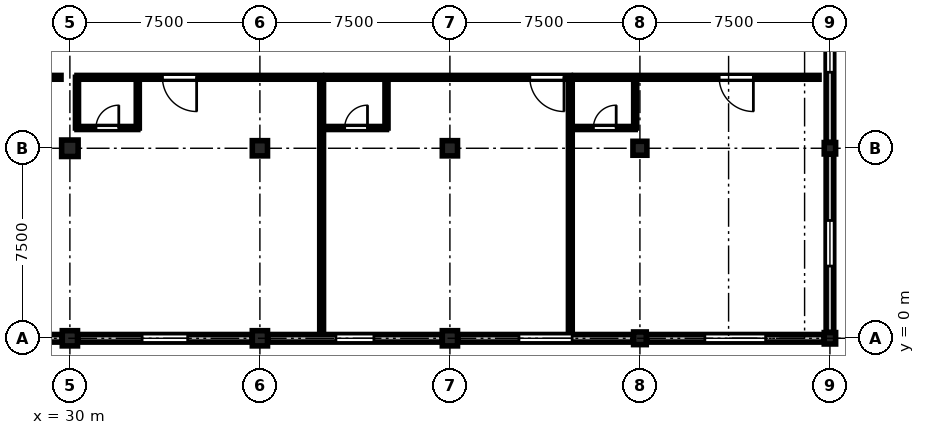
"""IFC4 building model, lengths in metres.
Left out: names, types, materials, properties, quantities, classifications, styles, units other than length and angle.
Written with IfcOpenShell. Run it as: python <this file> out.ifc"""

import sys

from ifc_helpers import new_model, si_unit, direction, frame, frame_2d, origin, origin_2d, place, context, subcontext, project, spatial, rectangle, circle, extrude, element, fill, save


model = new_model("IFC4")
c1 = context("Model", 3, precision=1e-05, world=origin(), true_north=direction((0.0, 1.0)))
c2 = subcontext(c1, "Body", "Model", "MODEL_VIEW")
j1 = project(units=[si_unit("LENGTHUNIT", "METRE"), si_unit("PLANEANGLEUNIT", "RADIAN")], contexts=[c1])
p1 = place(None, origin())
s1 = spatial("IfcSite", under=j1, at=p1, CompositionType="ELEMENT")
p2 = place(p1, origin())
s2 = spatial("IfcBuilding", under=s1, at=p2, CompositionType="ELEMENT")
p3 = place(p2, frame((0.0, 0.0, 17.85)))
s3 = spatial("IfcBuildingStorey", under=s2, at=p3, CompositionType="ELEMENT", Elevation=17.85)
p4 = place(p3, frame((30.0, 0.0, 0.0), z_axis=(0.0, 0.0, 1.0), x_axis=(1.0, 0.0, 0.0)))
e1 = element("IfcColumn", 1, at=p4, inside=s3, PredefinedType="COLUMN", context=c2, shape_type="SweptSolid", body=[
    extrude(rectangle(XDim=0.6, YDim=0.6, at=origin_2d()), origin(), (0.0, 0.0, 1.0), 4.05),
])
p5 = place(p3, frame((30.0, 7.5, 0.0), z_axis=(0.0, 0.0, 1.0), x_axis=(1.0, 0.0, 0.0)))
e2 = element("IfcColumn", 2, at=p5, inside=s3, PredefinedType="COLUMN", context=c2, shape_type="SweptSolid", body=[
    extrude(rectangle(XDim=0.65, YDim=0.65, at=origin_2d()), origin(), (0.0, 0.0, 1.0), 4.05),
])
p6 = place(p3, frame((37.5, 0.0, 0.0), z_axis=(0.0, 0.0, 1.0), x_axis=(1.0, 0.0, 0.0)))
e3 = element("IfcColumn", 3, at=p6, inside=s3, PredefinedType="COLUMN", context=c2, shape_type="SweptSolid", body=[
    extrude(rectangle(XDim=0.6, YDim=0.6, at=origin_2d()), origin(), (0.0, 0.0, 1.0), 4.05),
])
for number, where, z_axis, x_axis in (
    (4, (37.5, 7.5, 0.0), (0.0, 0.0, 1.0), (1.0, 0.0, 0.0)),
    (5, (45.0, 0.0, 0.0), (0.0, 0.0, 1.0), (1.0, 0.0, 0.0)),
):
    element("IfcColumn", number, at=place(p3, frame(where, z_axis=z_axis, x_axis=x_axis)), inside=s3, PredefinedType="COLUMN", context=c2, shape_type="SweptSolid", body=[
        extrude(circle(Radius=0.3, at=origin_2d()), origin(), (0.0, 0.0, 1.0), 4.05),
    ])
p7 = place(p3, frame((45.0, 7.5, 0.0), z_axis=(0.0, 0.0, 1.0), x_axis=(1.0, 0.0, 0.0)))
e6 = element("IfcColumn", 6, at=p7, inside=s3, PredefinedType="COLUMN", context=c2, shape_type="SweptSolid", body=[
    extrude(rectangle(XDim=0.6, YDim=0.6, at=origin_2d()), origin(), (0.0, 0.0, 1.0), 4.05),
])
p8 = place(p3, frame((52.5, 0.0, 0.0), z_axis=(0.0, 0.0, 1.0), x_axis=(1.0, 0.0, 0.0)))
e7 = element("IfcColumn", 7, at=p8, inside=s3, PredefinedType="COLUMN", context=c2, shape_type="SweptSolid", body=[
    extrude(rectangle(XDim=0.5, YDim=0.5, at=origin_2d()), origin(), (0.0, 0.0, 1.0), 4.05),
])
p9 = place(p3, frame((52.5, 7.5, 0.0), z_axis=(0.0, 0.0, 1.0), x_axis=(1.0, 0.0, 0.0)))
e8 = element("IfcColumn", 8, at=p9, inside=s3, PredefinedType="COLUMN", context=c2, shape_type="SweptSolid", body=[
    extrude(rectangle(XDim=0.55, YDim=0.55, at=origin_2d()), origin(), (0.0, 0.0, 1.0), 4.05),
])
for number, where, z_axis, x_axis in (
    (9, (60.0, 0.0, 0.0), (0.0, 0.0, 1.0), (1.0, 0.0, 0.0)),
    (10, (60.0, 7.5, 0.0), (0.0, 0.0, 1.0), (1.0, 0.0, 0.0)),
):
    element("IfcColumn", number, at=place(p3, frame(where, z_axis=z_axis, x_axis=x_axis)), inside=s3, PredefinedType="COLUMN", context=c2, shape_type="SweptSolid", body=[
        extrude(rectangle(XDim=0.45, YDim=0.45, at=origin_2d()), origin(), (0.0, 0.0, 1.0), 4.05),
    ])
p10 = place(p3, frame((29.69, 0.0, 0.0), z_axis=(0.0, 0.0, 1.0), x_axis=(-1.0, 0.0, 0.0)))
e11 = element("IfcWall", 11, at=p10, inside=s3, PredefinedType="STANDARD", context=c2, shape_type="SweptSolid", body=[
    extrude(rectangle(XDim=6.88, YDim=0.3, at=frame_2d((3.44, 0.0))), origin(), (0.0, 0.0, 1.0), 3.17),
])
p11 = place(p10, frame((2.54, 0.0, 0.9)))
e12 = element("IfcOpeningElement", 12, at=p11, cuts=e11, PredefinedType="OPENING", context=c2, shape_type="SweptSolid", body=[
    extrude(rectangle(XDim=1.8, YDim=1.8, at=frame_2d((0.9, 0.9))), frame((0.0, 0.16, 0.0), z_axis=(0.0, -1.0, 0.0), x_axis=(1.0, 0.0, 0.0)), (0.0, 0.0, 1.0), 0.32),
])
p12 = place(p3, frame((37.19, 0.0, 0.0), z_axis=(0.0, 0.0, 1.0), x_axis=(-1.0, 0.0, 0.0)))
e13 = element("IfcWall", 13, at=p12, inside=s3, PredefinedType="STANDARD", context=c2, shape_type="SweptSolid", body=[
    extrude(rectangle(XDim=6.88, YDim=0.3, at=frame_2d((3.44, 0.0))), origin(), (0.0, 0.0, 1.0), 3.17),
])
p13 = place(p12, frame((2.54, 0.0, 0.9)))
e14 = element("IfcOpeningElement", 14, at=p13, cuts=e13, PredefinedType="OPENING", context=c2, shape_type="SweptSolid", body=[
    extrude(rectangle(XDim=1.8, YDim=1.99, at=frame_2d((0.9, 0.995))), frame((0.0, 0.16, 0.0), z_axis=(0.0, -1.0, 0.0), x_axis=(1.0, 0.0, 0.0)), (0.0, 0.0, 1.0), 0.32),
])
p14 = place(p3, frame((44.69, 0.0, 0.0), z_axis=(0.0, 0.0, 1.0), x_axis=(-1.0, 0.0, 0.0)))
e15 = element("IfcWall", 15, at=p14, inside=s3, PredefinedType="STANDARD", context=c2, shape_type="SweptSolid", body=[
    extrude(rectangle(XDim=6.88, YDim=0.3, at=frame_2d((3.44, 0.0))), origin(), (0.0, 0.0, 1.0), 3.17),
])
p15 = place(p14, frame((2.69, 0.0, 0.9)))
e16 = element("IfcOpeningElement", 16, at=p15, cuts=e15, PredefinedType="OPENING", context=c2, shape_type="SweptSolid", body=[
    extrude(rectangle(XDim=1.5, YDim=1.99, at=frame_2d((0.75, 0.995))), frame((0.0, 0.16, 0.0), z_axis=(0.0, -1.0, 0.0), x_axis=(1.0, 0.0, 0.0)), (0.0, 0.0, 1.0), 0.32),
])
p16 = place(p3, frame((52.24, 0.0, 0.0), z_axis=(0.0, 0.0, 1.0), x_axis=(-1.0, 0.0, 0.0)))
e17 = element("IfcWall", 17, at=p16, inside=s3, PredefinedType="STANDARD", context=c2, shape_type="SweptSolid", body=[
    extrude(rectangle(XDim=6.93, YDim=0.3, at=frame_2d((3.465, 0.0))), origin(), (0.0, 0.0, 1.0), 3.17),
])
p17 = place(p16, frame((2.415, 0.0, 0.9)))
e18 = element("IfcOpeningElement", 18, at=p17, cuts=e17, PredefinedType="OPENING", context=c2, shape_type="SweptSolid", body=[
    extrude(rectangle(XDim=2.1, YDim=1.99, at=frame_2d((1.05, 0.995))), frame((0.0, 0.16, 0.0), z_axis=(0.0, -1.0, 0.0), x_axis=(1.0, 0.0, 0.0)), (0.0, 0.0, 1.0), 0.32),
])
p18 = place(p3, frame((59.765, 0.0, 0.0), z_axis=(0.0, 0.0, 1.0), x_axis=(-1.0, 0.0, 0.0)))
e19 = element("IfcWall", 19, at=p18, inside=s3, PredefinedType="STANDARD", context=c2, shape_type="SweptSolid", body=[
    extrude(rectangle(XDim=7.005, YDim=0.3, at=frame_2d((3.502, 0.0))), origin(), (0.0, 0.0, 1.0), 3.17),
])
p19 = place(p18, frame((2.302, 0.0, 0.9)))
e20 = element("IfcOpeningElement", 20, at=p19, cuts=e19, PredefinedType="OPENING", context=c2, shape_type="SweptSolid", body=[
    extrude(rectangle(XDim=2.4, YDim=1.99, at=frame_2d((1.2, 0.995))), frame((0.0, 0.16, 0.0), z_axis=(0.0, -1.0, 0.0), x_axis=(1.0, 0.0, 0.0)), (0.0, 0.0, 1.0), 0.32),
])
p20 = place(p3, frame((60.0, 7.265, 0.0), z_axis=(0.0, 0.0, 1.0), x_axis=(0.0, -1.0, 0.0)))
e21 = element("IfcWall", 21, at=p20, inside=s3, PredefinedType="STANDARD", context=c2, shape_type="SweptSolid", body=[
    extrude(rectangle(XDim=7.03, YDim=0.3, at=frame_2d((3.515, 0.0))), origin(), (0.0, 0.0, 1.0), 3.17),
])
p21 = place(p20, frame((2.615, 0.0, 0.9)))
e22 = element("IfcOpeningElement", 22, at=p21, cuts=e21, PredefinedType="OPENING", context=c2, shape_type="SweptSolid", body=[
    extrude(rectangle(XDim=1.8, YDim=1.99, at=frame_2d((0.9, 0.995))), frame((0.0, 0.16, 0.0), z_axis=(0.0, -1.0, 0.0), x_axis=(1.0, 0.0, 0.0)), (0.0, 0.0, 1.0), 0.32),
])
p22 = place(p3, frame((60.0, 14.765, 0.0), z_axis=(0.0, 0.0, 1.0), x_axis=(0.0, -1.0, 0.0)))
e23 = element("IfcWall", 23, at=p22, inside=s3, PredefinedType="STANDARD", context=c2, shape_type="SweptSolid", body=[
    extrude(rectangle(XDim=7.03, YDim=0.3, at=frame_2d((3.515, 0.0))), origin(), (0.0, 0.0, 1.0), 3.17),
])
p23 = place(p22, frame((2.765, 0.0, 0.9)))
e24 = element("IfcOpeningElement", 24, at=p23, cuts=e23, PredefinedType="OPENING", context=c2, shape_type="SweptSolid", body=[
    extrude(rectangle(XDim=1.5, YDim=1.99, at=frame_2d((0.75, 0.995))), frame((0.0, 0.16, 0.0), z_axis=(0.0, -1.0, 0.0), x_axis=(1.0, 0.0, 0.0)), (0.0, 0.0, 1.0), 0.32),
])
p24 = place(p3, frame((39.937, 10.3, 0.0), z_axis=(0.0, 0.0, 1.0), x_axis=(-1.0, 0.0, 0.0)))
e25 = element("IfcWall", 25, at=p24, inside=s3, PredefinedType="PARTITIONING", context=c2, shape_type="SweptSolid", body=[
    extrude(rectangle(XDim=9.657, YDim=0.15, at=frame_2d((4.828, 0.0))), origin(), (0.0, 0.0, 1.0), 3.755),
])
p25 = place(p24, frame((4.934, 0.0, 0.0)))
e26 = element("IfcOpeningElement", 26, at=p25, cuts=e25, PredefinedType="OPENING", context=c2, shape_type="SweptSolid", body=[
    extrude(rectangle(XDim=1.35, YDim=2.25, at=frame_2d((0.675, 1.125))), frame((0.0, 0.085, 0.0), z_axis=(0.0, -1.0, 0.0), x_axis=(1.0, 0.0, 0.0)), (0.0, 0.0, 1.0), 0.17),
])
p26 = place(p3, frame((30.28, 8.3, 0.0), z_axis=(0.0, 0.0, 1.0), x_axis=(1.0, 0.0, 0.0)))
e27 = element("IfcWall", 27, at=p26, inside=s3, PredefinedType="PARTITIONING", context=c2, shape_type="SweptSolid", body=[
    extrude(rectangle(XDim=2.4, YDim=0.12, at=frame_2d((1.2, 0.0))), origin(), (0.0, 0.0, 1.0), 3.755),
])
p27 = place(p26, frame((0.75, 0.0, 0.0)))
e28 = element("IfcOpeningElement", 28, at=p27, cuts=e27, PredefinedType="OPENING", context=c2, shape_type="SweptSolid", body=[
    extrude(rectangle(XDim=0.9, YDim=2.1, at=frame_2d((0.45, 1.05))), frame((0.0, 0.07, 0.0), z_axis=(0.0, -1.0, 0.0), x_axis=(1.0, 0.0, 0.0)), (0.0, 0.0, 1.0), 0.14),
])
p28 = place(p3, frame((32.68, 8.3, 0.0), z_axis=(0.0, 0.0, 1.0), x_axis=(0.0, 1.0, 0.0)))
e29 = element("IfcWall", 29, at=p28, inside=s3, PredefinedType="PARTITIONING", context=c2, shape_type="SweptSolid", body=[
    extrude(rectangle(XDim=2.0, YDim=0.12, at=frame_2d((1.0, 0.0))), origin(), (0.0, 0.0, 1.0), 3.755),
])
p29 = place(p3, frame((49.753, 10.3, 0.0), z_axis=(0.0, 0.0, 1.0), x_axis=(-1.0, 0.0, 0.0)))
e30 = element("IfcWall", 30, at=p29, inside=s3, PredefinedType="PARTITIONING", context=c2, shape_type="SweptSolid", body=[
    extrude(rectangle(XDim=9.657, YDim=0.15, at=frame_2d((4.828, 0.0))), origin(), (0.0, 0.0, 1.0), 3.755),
])
p30 = place(p29, frame((0.25, 0.0, 0.0)))
e31 = element("IfcOpeningElement", 31, at=p30, cuts=e30, PredefinedType="OPENING", context=c2, shape_type="SweptSolid", body=[
    extrude(rectangle(XDim=1.35, YDim=2.25, at=frame_2d((0.675, 1.125))), frame((0.0, 0.085, 0.0), z_axis=(0.0, -1.0, 0.0), x_axis=(1.0, 0.0, 0.0)), (0.0, 0.0, 1.0), 0.17),
])
p31 = place(p3, frame((40.097, 8.3, 0.0), z_axis=(0.0, 0.0, 1.0), x_axis=(1.0, 0.0, 0.0)))
e32 = element("IfcWall", 32, at=p31, inside=s3, PredefinedType="PARTITIONING", context=c2, shape_type="SweptSolid", body=[
    extrude(rectangle(XDim=2.4, YDim=0.12, at=frame_2d((1.2, 0.0))), origin(), (0.0, 0.0, 1.0), 3.755),
])
p32 = place(p31, frame((0.75, 0.0, 0.0)))
e33 = element("IfcOpeningElement", 33, at=p32, cuts=e32, PredefinedType="OPENING", context=c2, shape_type="SweptSolid", body=[
    extrude(rectangle(XDim=0.9, YDim=2.1, at=frame_2d((0.45, 1.05))), frame((0.0, 0.07, 0.0), z_axis=(0.0, -1.0, 0.0), x_axis=(1.0, 0.0, 0.0)), (0.0, 0.0, 1.0), 0.14),
])
p33 = place(p3, frame((42.497, 8.3, 0.0), z_axis=(0.0, 0.0, 1.0), x_axis=(0.0, 1.0, 0.0)))
e34 = element("IfcWall", 34, at=p33, inside=s3, PredefinedType="PARTITIONING", context=c2, shape_type="SweptSolid", body=[
    extrude(rectangle(XDim=2.0, YDim=0.12, at=frame_2d((1.0, 0.0))), origin(), (0.0, 0.0, 1.0), 3.755),
])
p34 = place(p3, frame((59.57, 10.3, 0.0), z_axis=(0.0, 0.0, 1.0), x_axis=(-1.0, 0.0, 0.0)))
e35 = element("IfcWall", 35, at=p34, inside=s3, PredefinedType="PARTITIONING", context=c2, shape_type="SweptSolid", body=[
    extrude(rectangle(XDim=9.657, YDim=0.15, at=frame_2d((4.828, 0.0))), origin(), (0.0, 0.0, 1.0), 3.755),
])
p35 = place(p34, frame((2.592, 0.0, 0.0)))
e36 = element("IfcOpeningElement", 36, at=p35, cuts=e35, PredefinedType="OPENING", context=c2, shape_type="SweptSolid", body=[
    extrude(rectangle(XDim=1.35, YDim=2.25, at=frame_2d((0.675, 1.125))), frame((0.0, 0.085, 0.0), z_axis=(0.0, -1.0, 0.0), x_axis=(1.0, 0.0, 0.0)), (0.0, 0.0, 1.0), 0.17),
])
p36 = place(p3, frame((49.913, 8.3, 0.0), z_axis=(0.0, 0.0, 1.0), x_axis=(1.0, 0.0, 0.0)))
e37 = element("IfcWall", 37, at=p36, inside=s3, PredefinedType="PARTITIONING", context=c2, shape_type="SweptSolid", body=[
    extrude(rectangle(XDim=2.4, YDim=0.12, at=frame_2d((1.2, 0.0))), origin(), (0.0, 0.0, 1.0), 3.755),
])
p37 = place(p36, frame((0.75, 0.0, 0.0)))
e38 = element("IfcOpeningElement", 38, at=p37, cuts=e37, PredefinedType="OPENING", context=c2, shape_type="SweptSolid", body=[
    extrude(rectangle(XDim=0.9, YDim=2.1, at=frame_2d((0.45, 1.05))), frame((0.0, 0.07, 0.0), z_axis=(0.0, -1.0, 0.0), x_axis=(1.0, 0.0, 0.0)), (0.0, 0.0, 1.0), 0.14),
])
p38 = place(p3, frame((52.313, 8.3, 0.0), z_axis=(0.0, 0.0, 1.0), x_axis=(0.0, 1.0, 0.0)))
e39 = element("IfcWall", 39, at=p38, inside=s3, PredefinedType="PARTITIONING", context=c2, shape_type="SweptSolid", body=[
    extrude(rectangle(XDim=2.0, YDim=0.12, at=frame_2d((1.0, 0.0))), origin(), (0.0, 0.0, 1.0), 3.205),
])
p39 = place(p3, frame((18.45, 10.3, 0.0), z_axis=(0.0, 0.0, 1.0), x_axis=(1.0, 0.0, 0.0)))
e40 = element("IfcWall", 40, at=p39, inside=s3, PredefinedType="PARTITIONING", context=c2, shape_type="SweptSolid", body=[
    extrude(rectangle(XDim=11.2, YDim=0.15, at=frame_2d((5.6, 0.0))), origin(), (0.0, 0.0, 1.0), 3.755),
])
for number, where, z_axis, x_axis in (
    (41, (39.937, 0.35, 0.0), (0.0, 0.0, 1.0), (0.0, 1.0, 0.0)),
    (42, (49.753, 0.35, 0.0), (0.0, 0.0, 1.0), (0.0, 1.0, 0.0)),
):
    element("IfcWall", number, at=place(p3, frame(where, z_axis=z_axis, x_axis=x_axis)), inside=s3, PredefinedType="PARTITIONING", context=c2, shape_type="SweptSolid", body=[
        extrude(rectangle(XDim=9.95, YDim=0.15, at=frame_2d((4.975, 0.0))), origin(), (0.0, 0.0, 1.0), 3.755),
    ])
p40 = place(p3, frame((30.28, 8.3, 0.0), z_axis=(0.0, 0.0, 1.0), x_axis=(0.0, 1.0, 0.0)))
e43 = element("IfcWall", 43, at=p40, inside=s3, PredefinedType="PARTITIONING", context=c2, shape_type="SweptSolid", body=[
    extrude(rectangle(XDim=2.0, YDim=0.12, at=frame_2d((1.0, 0.0))), origin(), (0.0, 0.0, 1.0), 3.255),
])
p41 = place(p13, origin())
e44 = element("IfcWindow", 44, at=p41, inside=s3, PartitioningType="SINGLE_PANEL", PredefinedType="WINDOW", context=c2, shape_type="SweptSolid", body=[
    extrude(rectangle(XDim=1.8, YDim=1.99, at=frame_2d((0.9, 0.995))), frame((0.0, 0.03, 0.0), z_axis=(0.0, -1.0, 0.0), x_axis=(1.0, 0.0, 0.0)), (0.0, 0.0, 1.0), 0.06),
])
fill(e14, e44)
p42 = place(p15, origin())
e45 = element("IfcWindow", 45, at=p42, inside=s3, PartitioningType="SINGLE_PANEL", PredefinedType="WINDOW", context=c2, shape_type="SweptSolid", body=[
    extrude(rectangle(XDim=1.5, YDim=1.99, at=frame_2d((0.75, 0.995))), frame((0.0, 0.03, 0.0), z_axis=(0.0, -1.0, 0.0), x_axis=(1.0, 0.0, 0.0)), (0.0, 0.0, 1.0), 0.06),
])
fill(e16, e45)
p43 = place(p17, origin())
e46 = element("IfcWindow", 46, at=p43, inside=s3, PartitioningType="SINGLE_PANEL", PredefinedType="WINDOW", context=c2, shape_type="SweptSolid", body=[
    extrude(rectangle(XDim=2.1, YDim=1.99, at=frame_2d((1.05, 0.995))), frame((0.0, 0.03, 0.0), z_axis=(0.0, -1.0, 0.0), x_axis=(1.0, 0.0, 0.0)), (0.0, 0.0, 1.0), 0.06),
])
fill(e18, e46)
p44 = place(p19, origin())
e47 = element("IfcWindow", 47, at=p44, inside=s3, PartitioningType="SINGLE_PANEL", PredefinedType="WINDOW", context=c2, shape_type="SweptSolid", body=[
    extrude(rectangle(XDim=2.4, YDim=1.99, at=frame_2d((1.2, 0.995))), frame((0.0, 0.03, 0.0), z_axis=(0.0, -1.0, 0.0), x_axis=(1.0, 0.0, 0.0)), (0.0, 0.0, 1.0), 0.06),
])
fill(e20, e47)
p45 = place(p21, origin())
e48 = element("IfcWindow", 48, at=p45, inside=s3, PartitioningType="SINGLE_PANEL", PredefinedType="WINDOW", context=c2, shape_type="SweptSolid", body=[
    extrude(rectangle(XDim=1.8, YDim=1.99, at=frame_2d((0.9, 0.995))), frame((0.0, 0.03, 0.0), z_axis=(0.0, -1.0, 0.0), x_axis=(1.0, 0.0, 0.0)), (0.0, 0.0, 1.0), 0.06),
])
fill(e22, e48)
p46 = place(p23, origin())
e49 = element("IfcWindow", 49, at=p46, inside=s3, PartitioningType="SINGLE_PANEL", PredefinedType="WINDOW", context=c2, shape_type="SweptSolid", body=[
    extrude(rectangle(XDim=1.5, YDim=1.99, at=frame_2d((0.75, 0.995))), frame((0.0, 0.03, 0.0), z_axis=(0.0, -1.0, 0.0), x_axis=(1.0, 0.0, 0.0)), (0.0, 0.0, 1.0), 0.06),
])
fill(e24, e49)
p47 = place(p25, origin())
e50 = element("IfcDoor", 50, at=p47, inside=s3, OperationType="SINGLE_SWING_LEFT", PredefinedType="DOOR", context=c2, shape_type="SweptSolid", body=[
    extrude(rectangle(XDim=1.35, YDim=2.25, at=frame_2d((0.675, 1.125))), frame((0.0, 0.025, 0.0), z_axis=(0.0, -1.0, 0.0), x_axis=(1.0, 0.0, 0.0)), (0.0, 0.0, 1.0), 0.05),
])
fill(e26, e50)
p48 = place(p27, origin())
e51 = element("IfcDoor", 51, at=p48, inside=s3, OperationType="SINGLE_SWING_RIGHT", PredefinedType="DOOR", context=c2, shape_type="SweptSolid", body=[
    extrude(rectangle(XDim=0.9, YDim=2.1, at=frame_2d((0.45, 1.05))), frame((0.0, 0.025, 0.0), z_axis=(0.0, -1.0, 0.0), x_axis=(1.0, 0.0, 0.0)), (0.0, 0.0, 1.0), 0.05),
])
fill(e28, e51)
p49 = place(p30, origin())
e52 = element("IfcDoor", 52, at=p49, inside=s3, OperationType="SINGLE_SWING_LEFT", PredefinedType="DOOR", context=c2, shape_type="SweptSolid", body=[
    extrude(rectangle(XDim=1.35, YDim=2.25, at=frame_2d((0.675, 1.125))), frame((0.0, 0.025, 0.0), z_axis=(0.0, -1.0, 0.0), x_axis=(1.0, 0.0, 0.0)), (0.0, 0.0, 1.0), 0.05),
])
fill(e31, e52)
p50 = place(p32, origin())
e53 = element("IfcDoor", 53, at=p50, inside=s3, OperationType="SINGLE_SWING_RIGHT", PredefinedType="DOOR", context=c2, shape_type="SweptSolid", body=[
    extrude(rectangle(XDim=0.9, YDim=2.1, at=frame_2d((0.45, 1.05))), frame((0.0, 0.025, 0.0), z_axis=(0.0, -1.0, 0.0), x_axis=(1.0, 0.0, 0.0)), (0.0, 0.0, 1.0), 0.05),
])
fill(e33, e53)
p51 = place(p35, origin())
e54 = element("IfcDoor", 54, at=p51, inside=s3, OperationType="SINGLE_SWING_LEFT", PredefinedType="DOOR", context=c2, shape_type="SweptSolid", body=[
    extrude(rectangle(XDim=1.35, YDim=2.25, at=frame_2d((0.675, 1.125))), frame((0.0, 0.025, 0.0), z_axis=(0.0, -1.0, 0.0), x_axis=(1.0, 0.0, 0.0)), (0.0, 0.0, 1.0), 0.05),
])
fill(e36, e54)
p52 = place(p37, origin())
e55 = element("IfcDoor", 55, at=p52, inside=s3, OperationType="SINGLE_SWING_RIGHT", PredefinedType="DOOR", context=c2, shape_type="SweptSolid", body=[
    extrude(rectangle(XDim=0.9, YDim=2.1, at=frame_2d((0.45, 1.05))), frame((0.0, 0.025, 0.0), z_axis=(0.0, -1.0, 0.0), x_axis=(1.0, 0.0, 0.0)), (0.0, 0.0, 1.0), 0.05),
])
fill(e38, e55)
save(model, sys.argv[1])
